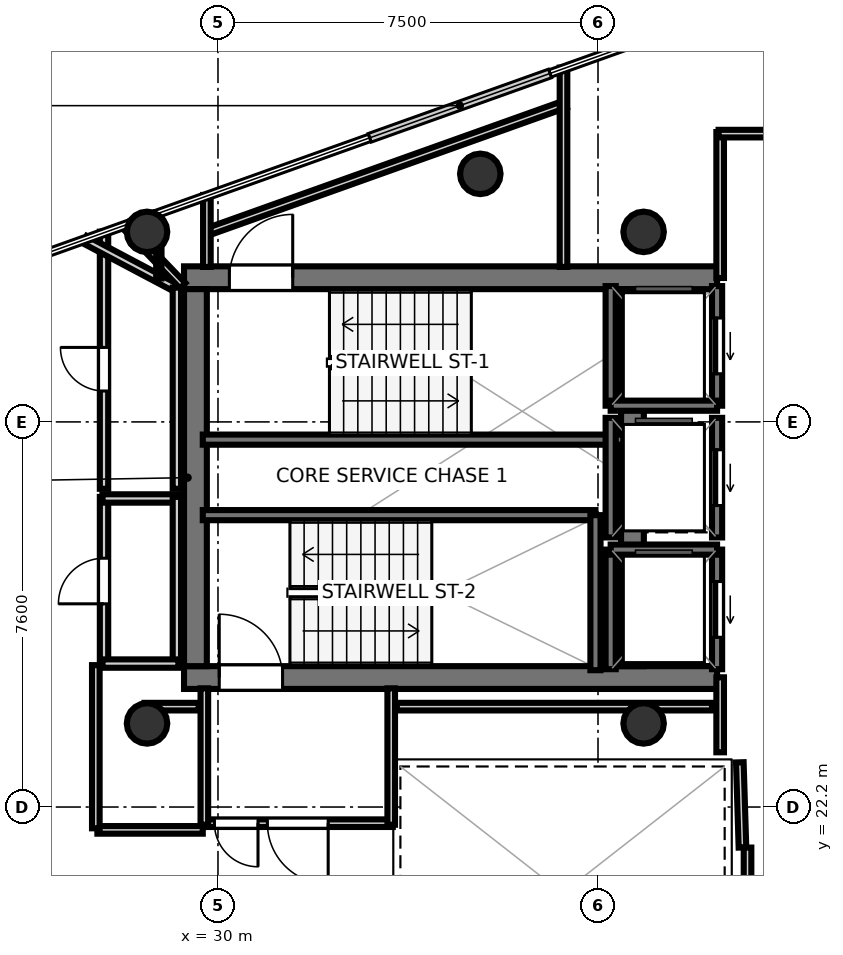
"""IFC4 building model, lengths in metres.
Left out: names, types, materials, properties, quantities, classifications, styles, units other than length and angle.
Written with IfcOpenShell. Run it as: python <this file> out.ifc"""

import sys

from ifc_helpers import new_model, si_unit, direction, frame, frame_2d, origin, origin_2d, place, context, subcontext, project, spatial, rectangle, hollow_circle, extrude, element, fill, save


model = new_model("IFC4")
c1 = context("Model", 3, precision=1e-05, world=origin(), true_north=direction((0.0, 1.0)))
c2 = subcontext(c1, "Body", "Model", "MODEL_VIEW")
j1 = project(units=[si_unit("LENGTHUNIT", "METRE"), si_unit("PLANEANGLEUNIT", "RADIAN")], contexts=[c1])
p1 = place(None, origin())
s1 = spatial("IfcSite", under=j1, at=p1, CompositionType="ELEMENT")
p2 = place(p1, origin())
s2 = spatial("IfcBuilding", under=s1, at=p2, CompositionType="ELEMENT")
p3 = place(p2, frame((0.0, 0.0, 337.0)))
s3 = spatial("IfcBuildingStorey", under=s2, at=p3, CompositionType="ELEMENT", Elevation=337.0)
p4 = place(p3, frame((29.33, 32.645, 0.0), z_axis=(0.0, 0.0, 1.0), x_axis=(1.0, 0.0, 0.0)))
e1 = element("IfcWall", 1, at=p4, inside=s3, PredefinedType="SHEAR", context=c2, shape_type="SweptSolid", body=[
    extrude(rectangle(XDim=10.52, YDim=0.45, at=frame_2d((5.26, 0.0))), origin(), (0.0, 0.0, 1.0), 3.52),
])
p5 = place(p4, frame((0.895, 0.0, 0.0)))
e2 = element("IfcOpeningElement", 2, at=p5, cuts=e1, PredefinedType="OPENING", context=c2, shape_type="SweptSolid", body=[
    extrude(rectangle(XDim=1.25, YDim=2.15, at=frame_2d((0.625, 1.075))), frame((0.0, 0.235, 0.0), z_axis=(0.0, -1.0, 0.0), x_axis=(1.0, 0.0, 0.0)), (0.0, 0.0, 1.0), 0.47),
])
p6 = place(p3, frame((29.33, 24.755, 0.0), z_axis=(0.0, 0.0, 1.0), x_axis=(1.0, 0.0, 0.0)))
e3 = element("IfcWall", 3, at=p6, inside=s3, PredefinedType="SHEAR", context=c2, shape_type="SweptSolid", body=[
    extrude(rectangle(XDim=10.52, YDim=0.45, at=frame_2d((5.26, 0.0))), origin(), (0.0, 0.0, 1.0), 3.52),
])
p7 = place(p6, frame((0.695, 0.0, 0.0)))
e4 = element("IfcOpeningElement", 4, at=p7, cuts=e3, PredefinedType="OPENING", context=c2, shape_type="SweptSolid", body=[
    extrude(rectangle(XDim=1.25, YDim=2.15, at=frame_2d((0.625, 1.075))), frame((0.0, 0.235, 0.0), z_axis=(0.0, -1.0, 0.0), x_axis=(1.0, 0.0, 0.0)), (0.0, 0.0, 1.0), 0.47),
])
for number, where, z_axis, x_axis in (
    (5, (29.555, 24.98, 0.0), (0.0, 0.0, 1.0), (0.0, 1.0, 0.0)),
    (6, (38.18, 24.98, 0.0), (0.0, 0.0, 1.0), (0.0, 1.0, 0.0)),
):
    element("IfcWall", number, at=place(p3, frame(where, z_axis=z_axis, x_axis=x_axis)), inside=s3, PredefinedType="SHEAR", context=c2, shape_type="SweptSolid", body=[
        extrude(rectangle(XDim=7.44, YDim=0.45, at=frame_2d((3.72, 0.0))), origin(), (0.0, 0.0, 1.0), 3.52),
    ])
for number, where, z_axis, x_axis in (
    (7, (28.6, 33.55, 0.0), (0.0, 0.0, 1.0), (1.0, 0.0, 0.0)),
    (8, (28.6, 23.85, 0.0), (0.0, 0.0, 1.0), (1.0, 0.0, 0.0)),
    (9, (38.4, 33.55, 0.0), (0.0, 0.0, 1.0), (1.0, 0.0, 0.0)),
    (10, (38.4, 23.85, 0.0), (0.0, 0.0, 1.0), (1.0, 0.0, 0.0)),
    (11, (35.177, 34.695, 0.0), (0.0, 0.0, 1.0), (1.0, 0.0, 0.0)),
):
    element("IfcColumn", number, at=place(p3, frame(where, z_axis=z_axis, x_axis=x_axis)), inside=s3, PredefinedType="COLUMN", context=c2, shape_type="SweptSolid", body=[
        extrude(hollow_circle(Radius=0.4, WallThickness=0.022, at=origin_2d()), origin(), (0.0, 0.0, 1.0), 3.7),
    ])
p8 = place(p3, frame((29.7, 29.45, 0.0), z_axis=(0.0, 0.0, 1.0), x_axis=(1.0, 0.0, 0.0)))
e12 = element("IfcWall", 12, at=p8, inside=s3, PredefinedType="SOLIDWALL", context=c2, shape_type="SweptSolid", body=[
    extrude(rectangle(XDim=8.3, YDim=0.2, at=frame_2d((4.15, 0.0))), origin(), (0.0, 0.0, 1.0), 3.52),
])
p9 = place(p3, frame((29.7, 27.96, 0.0), z_axis=(0.0, 0.0, 1.0), x_axis=(1.0, 0.0, 0.0)))
e13 = element("IfcWall", 13, at=p9, inside=s3, PredefinedType="SOLIDWALL", context=c2, shape_type="SweptSolid", body=[
    extrude(rectangle(XDim=7.75, YDim=0.2, at=frame_2d((3.875, 0.0))), origin(), (0.0, 0.0, 1.0), 3.52),
])
p10 = place(p3, frame((37.45, 24.9, 0.0), z_axis=(0.0, 0.0, 1.0), x_axis=(0.0, 1.0, 0.0)))
e14 = element("IfcWall", 14, at=p10, inside=s3, PredefinedType="SOLIDWALL", context=c2, shape_type="SweptSolid", body=[
    extrude(rectangle(XDim=3.06, YDim=0.2, at=frame_2d((1.53, 0.0))), origin(), (0.0, 0.0, 1.0), 3.52),
])
p11 = place(p3, frame((39.85, 30.12, 0.0), z_axis=(0.0, 0.0, 1.0), x_axis=(0.0, 1.0, 0.0)))
e15 = element("IfcWall", 15, at=p11, inside=s3, PredefinedType="SOLIDWALL", context=c2, shape_type="SweptSolid", body=[
    extrude(rectangle(XDim=2.36, YDim=0.2, at=frame_2d((1.18, 0.0))), origin(), (0.0, 0.0, 1.0), 3.52),
])
p12 = place(p11, frame((0.63, 0.0, 0.0)))
e16 = element("IfcOpeningElement", 16, at=p12, cuts=e15, PredefinedType="OPENING", context=c2, shape_type="SweptSolid", body=[
    extrude(rectangle(XDim=1.1, YDim=2.15, at=frame_2d((0.55, 1.075))), frame((0.0, 0.11, 0.0), z_axis=(0.0, -1.0, 0.0), x_axis=(1.0, 0.0, 0.0)), (0.0, 0.0, 1.0), 0.22),
])
p13 = place(p3, frame((37.75, 30.12, 0.0), z_axis=(0.0, 0.0, 1.0), x_axis=(0.0, 1.0, 0.0)))
e17 = element("IfcWall", 17, at=p13, inside=s3, PredefinedType="SOLIDWALL", context=c2, shape_type="SweptSolid", body=[
    extrude(rectangle(XDim=2.36, YDim=0.2, at=frame_2d((1.18, 0.0))), origin(), (0.0, 0.0, 1.0), 3.52),
])
p14 = place(p3, frame((37.75, 30.12, 0.0), z_axis=(0.0, 0.0, 1.0), x_axis=(1.0, 0.0, 0.0)))
e18 = element("IfcWall", 18, at=p14, inside=s3, PredefinedType="SOLIDWALL", context=c2, shape_type="SweptSolid", body=[
    extrude(rectangle(XDim=2.1, YDim=0.2, at=frame_2d((1.05, 0.0))), origin(), (0.0, 0.0, 1.0), 3.52),
])
p15 = place(p3, frame((39.85, 24.92, 0.0), z_axis=(0.0, 0.0, 1.0), x_axis=(0.0, 1.0, 0.0)))
e19 = element("IfcWall", 19, at=p15, inside=s3, PredefinedType="SOLIDWALL", context=c2, shape_type="SweptSolid", body=[
    extrude(rectangle(XDim=2.36, YDim=0.2, at=frame_2d((1.18, 0.0))), origin(), (0.0, 0.0, 1.0), 3.52),
])
p16 = place(p15, frame((0.63, 0.0, 0.0)))
e20 = element("IfcOpeningElement", 20, at=p16, cuts=e19, PredefinedType="OPENING", context=c2, shape_type="SweptSolid", body=[
    extrude(rectangle(XDim=1.1, YDim=2.15, at=frame_2d((0.55, 1.075))), frame((0.0, 0.11, 0.0), z_axis=(0.0, -1.0, 0.0), x_axis=(1.0, 0.0, 0.0)), (0.0, 0.0, 1.0), 0.22),
])
p17 = place(p3, frame((37.75, 24.92, 0.0), z_axis=(0.0, 0.0, 1.0), x_axis=(0.0, 1.0, 0.0)))
e21 = element("IfcWall", 21, at=p17, inside=s3, PredefinedType="SOLIDWALL", context=c2, shape_type="SweptSolid", body=[
    extrude(rectangle(XDim=2.36, YDim=0.2, at=frame_2d((1.18, 0.0))), origin(), (0.0, 0.0, 1.0), 3.52),
])
p18 = place(p3, frame((37.75, 27.28, 0.0), z_axis=(0.0, 0.0, 1.0), x_axis=(1.0, 0.0, 0.0)))
e22 = element("IfcWall", 22, at=p18, inside=s3, PredefinedType="SOLIDWALL", context=c2, shape_type="SweptSolid", body=[
    extrude(rectangle(XDim=2.1, YDim=0.2, at=frame_2d((1.05, 0.0))), origin(), (0.0, 0.0, 1.0), 3.52),
])
p19 = place(p3, frame((39.85, 27.52, 0.0), z_axis=(0.0, 0.0, 1.0), x_axis=(0.0, 1.0, 0.0)))
e23 = element("IfcWall", 23, at=p19, inside=s3, PredefinedType="SOLIDWALL", context=c2, shape_type="SweptSolid", body=[
    extrude(rectangle(XDim=2.36, YDim=0.2, at=frame_2d((1.18, 0.0))), origin(), (0.0, 0.0, 1.0), 3.52),
])
p20 = place(p19, frame((0.63, 0.0, 0.0)))
e24 = element("IfcOpeningElement", 24, at=p20, cuts=e23, PredefinedType="OPENING", context=c2, shape_type="SweptSolid", body=[
    extrude(rectangle(XDim=1.1, YDim=2.15, at=frame_2d((0.55, 1.075))), frame((0.0, 0.11, 0.0), z_axis=(0.0, -1.0, 0.0), x_axis=(1.0, 0.0, 0.0)), (0.0, 0.0, 1.0), 0.22),
])
p21 = place(p3, frame((37.75, 27.52, 0.0), z_axis=(0.0, 0.0, 1.0), x_axis=(0.0, 1.0, 0.0)))
e25 = element("IfcWall", 25, at=p21, inside=s3, PredefinedType="SOLIDWALL", context=c2, shape_type="SweptSolid", body=[
    extrude(rectangle(XDim=2.36, YDim=0.2, at=frame_2d((1.18, 0.0))), origin(), (0.0, 0.0, 1.0), 3.52),
])
p22 = place(p3, frame((29.76, 33.539, 0.0), z_axis=(0.0, 0.0, 1.0), x_axis=(0.941783667596, 0.336219457274, 0.0)))
e26 = element("IfcWall", 26, at=p22, inside=s3, PredefinedType="PARTITIONING", context=c2, shape_type="SweptSolid", body=[
    extrude(rectangle(XDim=7.539, YDim=0.15, at=frame_2d((3.77, 0.0))), origin(), (0.0, 0.0, 1.0), 2.84),
])
p23 = place(p3, frame((36.819, 36.791, 0.0), z_axis=(0.0, 0.0, 1.0), x_axis=(0.0, -1.0, 0.0)))
e27 = element("IfcWall", 27, at=p23, inside=s3, PredefinedType="PARTITIONING", context=c2, shape_type="SweptSolid", body=[
    extrude(rectangle(XDim=3.933, YDim=0.15, at=frame_2d((1.967, 0.0))), origin(), (0.0, 0.0, 1.0), 2.84),
])
p24 = place(p3, frame((29.781, 32.858, 0.0), z_axis=(0.0, 0.0, 1.0), x_axis=(0.0, 1.0, 0.0)))
e28 = element("IfcWall", 28, at=p24, inside=s3, PredefinedType="PARTITIONING", context=c2, shape_type="SweptSolid", body=[
    extrude(rectangle(XDim=1.421, YDim=0.15, at=frame_2d((0.71, 0.0))), origin(), (0.0, 0.0, 1.0), 2.84),
])
p25 = place(p3, frame((33.45, 21.881, 0.0), z_axis=(0.0, 0.0, 1.0), x_axis=(-1.0, 0.0, 0.0)))
e29 = element("IfcWall", 29, at=p25, inside=s3, PredefinedType="PARTITIONING", context=c2, shape_type="SweptSolid", body=[
    extrude(rectangle(XDim=3.75, YDim=0.15, at=frame_2d((1.875, 0.0))), origin(), (0.0, 0.0, 1.0), 2.84),
])
p26 = place(p25, frame((1.275, 0.0, 0.0)))
e30 = element("IfcOpeningElement", 30, at=p26, cuts=e29, PredefinedType="OPENING", context=c2, shape_type="SweptSolid", body=[
    extrude(rectangle(XDim=1.2, YDim=2.15, at=frame_2d((0.6, 1.075))), frame((0.0, 0.085, 0.0), z_axis=(0.0, -1.0, 0.0), x_axis=(1.0, 0.0, 0.0)), (0.0, 0.0, 1.0), 0.17),
])
p27 = place(p25, frame((2.66, 0.0, 0.0)))
e31 = element("IfcOpeningElement", 31, at=p27, cuts=e29, PredefinedType="OPENING", context=c2, shape_type="SweptSolid", body=[
    extrude(rectangle(XDim=0.86, YDim=2.05, at=frame_2d((0.43, 1.025))), frame((0.0, 0.085, 0.0), z_axis=(0.0, -1.0, 0.0), x_axis=(1.0, 0.0, 0.0)), (0.0, 0.0, 1.0), 0.17),
])
for number, where, z_axis, x_axis in (
    (32, (29.731, 21.85, 0.0), (0.0, 0.0, 1.0), (0.0, 1.0, 0.0)),
    (33, (33.419, 24.542, 0.0), (0.0, 0.0, 1.0), (0.0, -1.0, 0.0)),
):
    element("IfcWall", number, at=place(p3, frame(where, z_axis=z_axis, x_axis=x_axis)), inside=s3, PredefinedType="PARTITIONING", context=c2, shape_type="SweptSolid", body=[
        extrude(rectangle(XDim=2.692, YDim=0.15, at=frame_2d((1.346, 0.0))), origin(), (0.0, 0.0, 1.0), 2.84),
    ])
p28 = place(p3, frame((40.351, 21.401, 0.0), z_axis=(0.0, 0.0, 1.0), x_axis=(-0.031058045979, 0.999517582527, 0.0)))
e34 = element("IfcWall", 34, at=p28, inside=s3, PredefinedType="PARTITIONING", context=c2, shape_type="SweptSolid", body=[
    extrude(rectangle(XDim=1.682, YDim=0.15, at=frame_2d((0.841, 0.0))), origin(), (0.0, 0.0, 1.0), 2.84),
])
p29 = place(p3, frame((39.911, 23.28, 0.0), z_axis=(0.0, 0.0, 1.0), x_axis=(0.0, 1.0, 0.0)))
e35 = element("IfcWall", 35, at=p29, inside=s3, PredefinedType="PARTITIONING", context=c2, shape_type="SweptSolid", body=[
    extrude(rectangle(XDim=1.48, YDim=0.15, at=frame_2d((0.74, 0.0))), origin(), (0.0, 0.0, 1.0), 2.84),
])
p30 = place(p3, frame((39.911, 32.64, 0.0), z_axis=(0.0, 0.0, 1.0), x_axis=(0.0, 1.0, 0.0)))
e36 = element("IfcWall", 36, at=p30, inside=s3, PredefinedType="PARTITIONING", context=c2, shape_type="SweptSolid", body=[
    extrude(rectangle(XDim=2.88, YDim=0.15, at=frame_2d((1.44, 0.0))), origin(), (0.0, 0.0, 1.0), 2.84),
])
p31 = place(p3, frame((39.88, 35.489, 0.0), z_axis=(0.0, 0.0, 1.0), x_axis=(1.0, 0.0, 0.0)))
e37 = element("IfcWall", 37, at=p31, inside=s3, PredefinedType="PARTITIONING", context=c2, shape_type="SweptSolid", body=[
    extrude(rectangle(XDim=1.48, YDim=0.15, at=frame_2d((0.74, 0.0))), origin(), (0.0, 0.0, 1.0), 2.84),
])
p32 = place(p3, frame((40.451, 18.08, 0.0), z_axis=(0.0, 0.0, 1.0), x_axis=(0.0, 1.0, 0.0)))
e38 = element("IfcWall", 38, at=p32, inside=s3, PredefinedType="PARTITIONING", context=c2, shape_type="SweptSolid", body=[
    extrude(rectangle(XDim=3.32, YDim=0.15, at=frame_2d((1.66, 0.0))), origin(), (0.0, 0.0, 1.0), 2.84),
])
p33 = place(p3, frame((27.751, 25.0, 0.0), z_axis=(0.0, 0.0, 1.0), x_axis=(0.0, 1.0, 0.0)))
e39 = element("IfcWall", 39, at=p33, inside=s3, PredefinedType="PLUMBINGWALL", context=c2, shape_type="SweptSolid", body=[
    extrude(rectangle(XDim=3.32, YDim=0.165, at=frame_2d((1.66, 0.0))), origin(), (0.0, 0.0, 1.0), 2.84),
])
p34 = place(p33, frame((1.21, 0.0, 0.0)))
e40 = element("IfcOpeningElement", 40, at=p34, cuts=e39, PredefinedType="OPENING", context=c2, shape_type="SweptSolid", body=[
    extrude(rectangle(XDim=0.9, YDim=2.1, at=frame_2d((0.45, 1.05))), frame((0.0, 0.093, 0.0), z_axis=(0.0, -1.0, 0.0), x_axis=(1.0, 0.0, 0.0)), (0.0, 0.0, 1.0), 0.185),
])
p35 = place(p3, frame((27.72, 28.289, 0.0), z_axis=(0.0, 0.0, 1.0), x_axis=(1.0, 0.0, 0.0)))
e41 = element("IfcWall", 41, at=p35, inside=s3, PredefinedType="PLUMBINGWALL", context=c2, shape_type="SweptSolid", body=[
    extrude(rectangle(XDim=1.5, YDim=0.165, at=frame_2d((0.75, 0.0))), origin(), (0.0, 0.0, 1.0), 2.84),
])
p36 = place(p3, frame((29.189, 28.32, 0.0), z_axis=(0.0, 0.0, 1.0), x_axis=(0.0, -1.0, 0.0)))
e42 = element("IfcWall", 42, at=p36, inside=s3, PredefinedType="PLUMBINGWALL", context=c2, shape_type="SweptSolid", body=[
    extrude(rectangle(XDim=3.32, YDim=0.165, at=frame_2d((1.66, 0.0))), origin(), (0.0, 0.0, 1.0), 2.84),
])
p37 = place(p3, frame((29.22, 25.031, 0.0), z_axis=(0.0, 0.0, 1.0), x_axis=(-1.0, 0.0, 0.0)))
e43 = element("IfcWall", 43, at=p37, inside=s3, PredefinedType="PLUMBINGWALL", context=c2, shape_type="SweptSolid", body=[
    extrude(rectangle(XDim=1.5, YDim=0.165, at=frame_2d((0.75, 0.0))), origin(), (0.0, 0.0, 1.0), 2.84),
])
p38 = place(p3, frame((27.751, 28.48, 0.0), z_axis=(0.0, 0.0, 1.0), x_axis=(0.0, 1.0, 0.0)))
e44 = element("IfcWall", 44, at=p38, inside=s3, PredefinedType="PLUMBINGWALL", context=c2, shape_type="SweptSolid", body=[
    extrude(rectangle(XDim=5.074, YDim=0.165, at=frame_2d((2.537, 0.0))), origin(), (0.0, 0.0, 1.0), 2.84),
])
p39 = place(p38, frame((1.93, 0.0, 0.0)))
e45 = element("IfcOpeningElement", 45, at=p39, cuts=e44, PredefinedType="OPENING", context=c2, shape_type="SweptSolid", body=[
    extrude(rectangle(XDim=0.86, YDim=2.05, at=frame_2d((0.43, 1.025))), frame((0.0, 0.093, 0.0), z_axis=(0.0, -1.0, 0.0), x_axis=(1.0, 0.0, 0.0)), (0.0, 0.0, 1.0), 0.185),
])
p40 = place(p3, frame((27.371, 33.398, 0.0), z_axis=(0.0, 0.0, 1.0), x_axis=(0.883802105966, -0.467860916822, 0.0)))
e46 = element("IfcWall", 46, at=p40, inside=s3, PredefinedType="PLUMBINGWALL", context=c2, shape_type="SweptSolid", body=[
    extrude(rectangle(XDim=2.093, YDim=0.165, at=frame_2d((1.046, 0.0))), origin(), (0.0, 0.0, 1.0), 2.84),
])
p41 = place(p3, frame((29.189, 32.45, 0.0), z_axis=(0.0, 0.0, 1.0), x_axis=(0.0, -1.0, 0.0)))
e47 = element("IfcWall", 47, at=p41, inside=s3, PredefinedType="PLUMBINGWALL", context=c2, shape_type="SweptSolid", body=[
    extrude(rectangle(XDim=3.97, YDim=0.165, at=frame_2d((1.985, 0.0))), origin(), (0.0, 0.0, 1.0), 2.84),
])
p42 = place(p3, frame((29.62, 24.181, 0.0), z_axis=(0.0, 0.0, 1.0), x_axis=(-1.0, 0.0, 0.0)))
e48 = element("IfcWall", 48, at=p42, inside=s3, PredefinedType="PARTITIONING", context=c2, shape_type="SweptSolid", body=[
    extrude(rectangle(XDim=1.07, YDim=0.15, at=frame_2d((0.535, 0.0))), origin(), (0.0, 0.0, 1.0), 2.84),
])
p43 = place(p3, frame((29.303, 32.489, 0.0), z_axis=(0.0, 0.0, 1.0), x_axis=(-0.691860390613, 0.722031301192, 0.0)))
e49 = element("IfcWall", 49, at=p43, inside=s3, PredefinedType="PARTITIONING", context=c2, shape_type="SweptSolid", body=[
    extrude(rectangle(XDim=1.651, YDim=0.15, at=frame_2d((0.825, 0.0))), origin(), (0.0, 0.0, 1.0), 2.84),
])
p44 = place(p3, frame((39.75, 24.181, 0.0), z_axis=(0.0, 0.0, 1.0), x_axis=(-1.0, 0.0, 0.0)))
e50 = element("IfcWall", 50, at=p44, inside=s3, PredefinedType="PARTITIONING", context=c2, shape_type="SweptSolid", body=[
    extrude(rectangle(XDim=6.22, YDim=0.15, at=frame_2d((3.11, 0.0))), origin(), (0.0, 0.0, 1.0), 2.84),
])
p45 = place(p3, frame((27.62, 21.749, 0.0), z_axis=(0.0, 0.0, 1.0), x_axis=(1.0, 0.0, 0.0)))
e51 = element("IfcWall", 51, at=p45, inside=s3, PredefinedType="PARTITIONING", context=c2, shape_type="SweptSolid", body=[
    extrude(rectangle(XDim=2.08, YDim=0.15, at=frame_2d((1.04, 0.0))), origin(), (0.0, 0.0, 1.0), 2.84),
])
p46 = place(p3, frame((27.589, 25.0, 0.0), z_axis=(0.0, 0.0, 1.0), x_axis=(0.0, -1.0, 0.0)))
e52 = element("IfcWall", 52, at=p46, inside=s3, PredefinedType="PARTITIONING", context=c2, shape_type="SweptSolid", body=[
    extrude(rectangle(XDim=3.22, YDim=0.15, at=frame_2d((1.61, 0.0))), origin(), (0.0, 0.0, 1.0), 2.84),
])
p47 = place(p3, frame((28.833, 32.63, 0.0), z_axis=(0.0, 0.0, 1.0), x_axis=(0.0, 1.0, 0.0)))
e53 = element("IfcWall", 53, at=p47, inside=s3, PredefinedType="PARTITIONING", context=c2, shape_type="SweptSolid", body=[
    extrude(rectangle(XDim=1.31, YDim=0.105, at=frame_2d((0.655, 0.0))), origin(), (0.0, 0.0, 1.0), 2.84),
])
p48 = place(p3, frame((53.648, 39.995, 0.0), z_axis=(0.0, 0.0, 1.0), x_axis=(-0.368887988712, -0.929473857505, 0.0)))
e54 = element("IfcWall", 54, at=p48, inside=s3, PredefinedType="PARTITIONING", context=c2, shape_type="SweptSolid", body=[
    extrude(rectangle(XDim=35.003, YDim=0.105, at=frame_2d((17.501, 0.0))), origin(), (0.0, 0.0, 1.0), 2.84),
])
p49 = place(p5, origin())
e55 = element("IfcDoor", 55, at=p49, inside=s3, OperationType="SINGLE_SWING_RIGHT", PredefinedType="DOOR", context=c2, shape_type="SweptSolid", body=[
    extrude(rectangle(XDim=1.25, YDim=2.15, at=frame_2d((0.625, 1.075))), frame((0.0, 0.025, 0.0), z_axis=(0.0, -1.0, 0.0), x_axis=(1.0, 0.0, 0.0)), (0.0, 0.0, 1.0), 0.05),
])
fill(e2, e55)
p50 = place(p7, origin())
e56 = element("IfcDoor", 56, at=p50, inside=s3, OperationType="SINGLE_SWING_LEFT", PredefinedType="DOOR", context=c2, shape_type="SweptSolid", body=[
    extrude(rectangle(XDim=1.25, YDim=2.15, at=frame_2d((0.625, 1.075))), frame((0.0, 0.025, 0.0), z_axis=(0.0, -1.0, 0.0), x_axis=(1.0, 0.0, 0.0)), (0.0, 0.0, 1.0), 0.05),
])
fill(e4, e56)
p51 = place(p12, origin())
e57 = element("IfcDoor", 57, at=p51, inside=s3, OperationType="SLIDING_TO_LEFT", PredefinedType="DOOR", context=c2, shape_type="SweptSolid", body=[
    extrude(rectangle(XDim=1.1, YDim=2.15, at=frame_2d((0.55, 1.075))), frame((0.0, 0.025, 0.0), z_axis=(0.0, -1.0, 0.0), x_axis=(1.0, 0.0, 0.0)), (0.0, 0.0, 1.0), 0.05),
])
fill(e16, e57)
p52 = place(p16, origin())
e58 = element("IfcDoor", 58, at=p52, inside=s3, OperationType="SLIDING_TO_LEFT", PredefinedType="DOOR", context=c2, shape_type="SweptSolid", body=[
    extrude(rectangle(XDim=1.1, YDim=2.15, at=frame_2d((0.55, 1.075))), frame((0.0, 0.025, 0.0), z_axis=(0.0, -1.0, 0.0), x_axis=(1.0, 0.0, 0.0)), (0.0, 0.0, 1.0), 0.05),
])
fill(e20, e58)
p53 = place(p20, origin())
e59 = element("IfcDoor", 59, at=p53, inside=s3, OperationType="SLIDING_TO_LEFT", PredefinedType="DOOR", context=c2, shape_type="SweptSolid", body=[
    extrude(rectangle(XDim=1.1, YDim=2.15, at=frame_2d((0.55, 1.075))), frame((0.0, 0.025, 0.0), z_axis=(0.0, -1.0, 0.0), x_axis=(1.0, 0.0, 0.0)), (0.0, 0.0, 1.0), 0.05),
])
fill(e24, e59)
p54 = place(p26, origin())
e60 = element("IfcDoor", 60, at=p54, inside=s3, OperationType="SINGLE_SWING_LEFT", PredefinedType="DOOR", context=c2, shape_type="SweptSolid", body=[
    extrude(rectangle(XDim=1.2, YDim=2.15, at=frame_2d((0.6, 1.075))), frame((0.0, 0.025, 0.0), z_axis=(0.0, -1.0, 0.0), x_axis=(1.0, 0.0, 0.0)), (0.0, 0.0, 1.0), 0.05),
])
fill(e30, e60)
p55 = place(p34, origin())
e61 = element("IfcDoor", 61, at=p55, inside=s3, OperationType="SINGLE_SWING_LEFT", PredefinedType="DOOR", context=c2, shape_type="SweptSolid", body=[
    extrude(rectangle(XDim=0.9, YDim=2.1, at=frame_2d((0.45, 1.05))), frame((0.0, 0.025, 0.0), z_axis=(0.0, -1.0, 0.0), x_axis=(1.0, 0.0, 0.0)), (0.0, 0.0, 1.0), 0.05),
])
fill(e40, e61)
p56 = place(p39, origin())
e62 = element("IfcDoor", 62, at=p56, inside=s3, OperationType="SINGLE_SWING_RIGHT", PredefinedType="DOOR", context=c2, shape_type="SweptSolid", body=[
    extrude(rectangle(XDim=0.86, YDim=2.05, at=frame_2d((0.43, 1.025))), frame((0.0, 0.025, 0.0), z_axis=(0.0, -1.0, 0.0), x_axis=(1.0, 0.0, 0.0)), (0.0, 0.0, 1.0), 0.05),
])
fill(e45, e62)
p57 = place(p27, origin())
e63 = element("IfcDoor", 63, at=p57, inside=s3, OperationType="SINGLE_SWING_LEFT", PredefinedType="DOOR", context=c2, shape_type="SweptSolid", body=[
    extrude(rectangle(XDim=0.86, YDim=2.05, at=frame_2d((0.43, 1.025))), frame((0.0, 0.025, 0.0), z_axis=(0.0, -1.0, 0.0), x_axis=(1.0, 0.0, 0.0)), (0.0, 0.0, 1.0), 0.05),
])
fill(e31, e63)
save(model, sys.argv[1])
